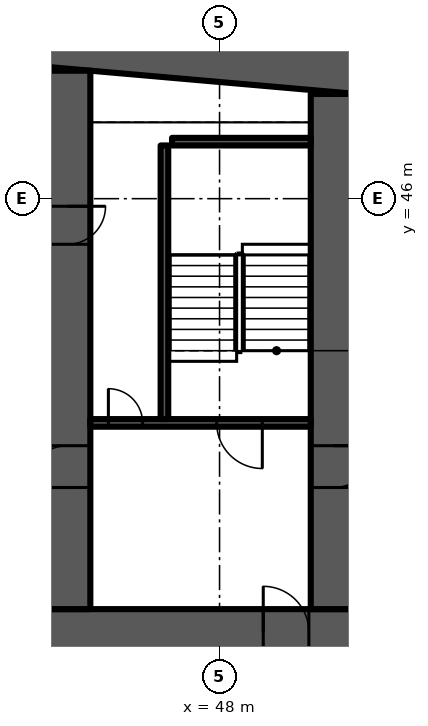
"""IFC4 building model, lengths in metres.
Left out: names, types, materials, properties, quantities, classifications, styles, units other than length and angle.
Written with IfcOpenShell. Run it as: python <this file> out.ifc"""

import sys

from ifc_helpers import new_model, si_unit, direction, frame, frame_2d, origin, place, context, subcontext, project, spatial, polyline, rectangle, outline, extrude, element, fill, save


model = new_model("IFC4")
c1 = context("Model", 3, precision=1e-05, world=origin(), true_north=direction((0.0, 1.0)))
c2 = subcontext(c1, "Body", "Model", "MODEL_VIEW")
j1 = project(units=[si_unit("LENGTHUNIT", "METRE"), si_unit("PLANEANGLEUNIT", "RADIAN")], contexts=[c1])
p1 = place(None, origin())
s1 = spatial("IfcSite", under=j1, at=p1, CompositionType="ELEMENT")
p2 = place(p1, origin())
s2 = spatial("IfcBuilding", under=s1, at=p2, CompositionType="ELEMENT")
p3 = place(p2, frame((0.0, 0.0, 77.5)))
s3 = spatial("IfcBuildingStorey", under=s2, at=p3, CompositionType="ELEMENT", Elevation=77.5)
p4 = place(p3, origin())
e1 = element("IfcWall", 1, at=p4, inside=s3, PredefinedType="SHEAR", context=c2, shape_type="SweptSolid", body=[
    extrude(outline(polyline([(9.0, 47.583), (37.0, 50.032), (65.0, 47.583), (65.0, 48.787), (37.0, 51.237), (9.0, 48.787), (9.0, 47.583)])), origin(), (0.0, 0.0, 1.0), 3.6),
])
p5 = place(p3, frame((9.0, 34.6, 0.0), z_axis=(0.0, 0.0, 1.0), x_axis=(1.0, 0.0, 0.0)))
e2 = element("IfcWall", 2, at=p5, inside=s3, PredefinedType="SHEAR", context=c2, shape_type="SweptSolid", body=[
    extrude(rectangle(XDim=56.0, YDim=1.2, at=frame_2d((28.0, 0.0))), origin(), (0.0, 0.0, 1.0), 3.6),
])
p6 = place(p5, frame((3.3, 0.0, 0.0)))
e3 = element("IfcOpeningElement", 3, at=p6, cuts=e2, PredefinedType="OPENING", context=c2, shape_type="SweptSolid", body=[
    extrude(rectangle(XDim=1.0, YDim=2.1, at=frame_2d((0.5, 1.05))), frame((0.0, 0.61, 0.0), z_axis=(0.0, -1.0, 0.0), x_axis=(1.0, 0.0, 0.0)), (0.0, 0.0, 1.0), 1.22),
])
p7 = place(p5, frame((7.867, 0.0, 0.0)))
e4 = element("IfcOpeningElement", 4, at=p7, cuts=e2, PredefinedType="OPENING", context=c2, shape_type="SweptSolid", body=[
    extrude(rectangle(XDim=1.1, YDim=2.1, at=frame_2d((0.55, 1.05))), frame((0.0, 0.61, 0.0), z_axis=(0.0, -1.0, 0.0), x_axis=(1.0, 0.0, 0.0)), (0.0, 0.0, 1.0), 1.22),
])
p8 = place(p5, frame((12.033, 0.0, 0.0)))
e5 = element("IfcOpeningElement", 5, at=p8, cuts=e2, PredefinedType="OPENING", context=c2, shape_type="SweptSolid", body=[
    extrude(rectangle(XDim=1.1, YDim=2.1, at=frame_2d((0.55, 1.05))), frame((0.0, 0.61, 0.0), z_axis=(0.0, -1.0, 0.0), x_axis=(1.0, 0.0, 0.0)), (0.0, 0.0, 1.0), 1.22),
])
p9 = place(p5, frame((9.8, 0.0, 0.0)))
e6 = element("IfcOpeningElement", 6, at=p9, cuts=e2, PredefinedType="OPENING", context=c2, shape_type="SweptSolid", body=[
    extrude(rectangle(XDim=1.4, YDim=2.1, at=frame_2d((0.7, 1.05))), frame((0.0, 0.61, 0.0), z_axis=(0.0, -1.0, 0.0), x_axis=(1.0, 0.0, 0.0)), (0.0, 0.0, 1.0), 1.22),
])
p10 = place(p5, frame((14.65, 0.0, 0.0)))
e7 = element("IfcOpeningElement", 7, at=p10, cuts=e2, PredefinedType="OPENING", context=c2, shape_type="SweptSolid", body=[
    extrude(rectangle(XDim=1.2, YDim=2.1, at=frame_2d((0.6, 1.05))), frame((0.0, 0.61, 0.0), z_axis=(0.0, -1.0, 0.0), x_axis=(1.0, 0.0, 0.0)), (0.0, 0.0, 1.0), 1.22),
])
p11 = place(p5, frame((21.867, 0.0, 0.0)))
e8 = element("IfcOpeningElement", 8, at=p11, cuts=e2, PredefinedType="OPENING", context=c2, shape_type="SweptSolid", body=[
    extrude(rectangle(XDim=1.1, YDim=2.1, at=frame_2d((0.55, 1.05))), frame((0.0, 0.61, 0.0), z_axis=(0.0, -1.0, 0.0), x_axis=(1.0, 0.0, 0.0)), (0.0, 0.0, 1.0), 1.22),
])
p12 = place(p5, frame((26.033, 0.0, 0.0)))
e9 = element("IfcOpeningElement", 9, at=p12, cuts=e2, PredefinedType="OPENING", context=c2, shape_type="SweptSolid", body=[
    extrude(rectangle(XDim=1.1, YDim=2.1, at=frame_2d((0.55, 1.05))), frame((0.0, 0.61, 0.0), z_axis=(0.0, -1.0, 0.0), x_axis=(1.0, 0.0, 0.0)), (0.0, 0.0, 1.0), 1.22),
])
p13 = place(p5, frame((23.8, 0.0, 0.0)))
e10 = element("IfcOpeningElement", 10, at=p13, cuts=e2, PredefinedType="OPENING", context=c2, shape_type="SweptSolid", body=[
    extrude(rectangle(XDim=1.4, YDim=2.1, at=frame_2d((0.7, 1.05))), frame((0.0, 0.61, 0.0), z_axis=(0.0, -1.0, 0.0), x_axis=(1.0, 0.0, 0.0)), (0.0, 0.0, 1.0), 1.22),
])
p14 = place(p5, frame((28.867, 0.0, 0.0)))
e11 = element("IfcOpeningElement", 11, at=p14, cuts=e2, PredefinedType="OPENING", context=c2, shape_type="SweptSolid", body=[
    extrude(rectangle(XDim=1.1, YDim=2.1, at=frame_2d((0.55, 1.05))), frame((0.0, 0.61, 0.0), z_axis=(0.0, -1.0, 0.0), x_axis=(1.0, 0.0, 0.0)), (0.0, 0.0, 1.0), 1.22),
])
p15 = place(p5, frame((33.033, 0.0, 0.0)))
e12 = element("IfcOpeningElement", 12, at=p15, cuts=e2, PredefinedType="OPENING", context=c2, shape_type="SweptSolid", body=[
    extrude(rectangle(XDim=1.1, YDim=2.1, at=frame_2d((0.55, 1.05))), frame((0.0, 0.61, 0.0), z_axis=(0.0, -1.0, 0.0), x_axis=(1.0, 0.0, 0.0)), (0.0, 0.0, 1.0), 1.22),
])
p16 = place(p5, frame((40.15, 0.0, 0.0)))
e13 = element("IfcOpeningElement", 13, at=p16, cuts=e2, PredefinedType="OPENING", context=c2, shape_type="SweptSolid", body=[
    extrude(rectangle(XDim=1.2, YDim=2.1, at=frame_2d((0.6, 1.05))), frame((0.0, 0.61, 0.0), z_axis=(0.0, -1.0, 0.0), x_axis=(1.0, 0.0, 0.0)), (0.0, 0.0, 1.0), 1.22),
])
p17 = place(p5, frame((44.8, 0.0, 0.0)))
e14 = element("IfcOpeningElement", 14, at=p17, cuts=e2, PredefinedType="OPENING", context=c2, shape_type="SweptSolid", body=[
    extrude(rectangle(XDim=1.4, YDim=2.1, at=frame_2d((0.7, 1.05))), frame((0.0, 0.61, 0.0), z_axis=(0.0, -1.0, 0.0), x_axis=(1.0, 0.0, 0.0)), (0.0, 0.0, 1.0), 1.22),
])
p18 = place(p5, frame((49.867, 0.0, 0.0)))
e15 = element("IfcOpeningElement", 15, at=p18, cuts=e2, PredefinedType="OPENING", context=c2, shape_type="SweptSolid", body=[
    extrude(rectangle(XDim=1.1, YDim=2.1, at=frame_2d((0.55, 1.05))), frame((0.0, 0.61, 0.0), z_axis=(0.0, -1.0, 0.0), x_axis=(1.0, 0.0, 0.0)), (0.0, 0.0, 1.0), 1.22),
])
p19 = place(p5, frame((53.5, 0.0, 0.0)))
e16 = element("IfcOpeningElement", 16, at=p19, cuts=e2, PredefinedType="OPENING", context=c2, shape_type="SweptSolid", body=[
    extrude(rectangle(XDim=1.1, YDim=2.1, at=frame_2d((0.55, 1.05))), frame((0.0, 0.61, 0.0), z_axis=(0.0, -1.0, 0.0), x_axis=(1.0, 0.0, 0.0)), (0.0, 0.0, 1.0), 1.22),
])
p20 = place(p5, frame((51.567, 0.0, 0.0)))
e17 = element("IfcOpeningElement", 17, at=p20, cuts=e2, PredefinedType="OPENING", context=c2, shape_type="SweptSolid", body=[
    extrude(rectangle(XDim=1.4, YDim=2.1, at=frame_2d((0.7, 1.05))), frame((0.0, 0.61, 0.0), z_axis=(0.0, -1.0, 0.0), x_axis=(1.0, 0.0, 0.0)), (0.0, 0.0, 1.0), 1.22),
])
p21 = place(p3, frame((44.0, 35.2, 0.0), z_axis=(0.0, 0.0, 1.0), x_axis=(0.0, 1.0, 0.0)))
e18 = element("IfcWall", 18, at=p21, inside=s3, PredefinedType="SHEAR", context=c2, shape_type="SweptSolid", body=[
    extrude(rectangle(XDim=14.168, YDim=1.2, at=frame_2d((7.084, 0.0))), origin(), (0.0, 0.0, 1.0), 3.6),
])
p22 = place(p21, frame((3.2, 0.0, 0.0)))
e19 = element("IfcOpeningElement", 19, at=p22, cuts=e18, PredefinedType="OPENING", context=c2, shape_type="SweptSolid", body=[
    extrude(rectangle(XDim=1.1, YDim=2.1, at=frame_2d((0.55, 1.05))), frame((0.0, 0.61, 0.0), z_axis=(0.0, -1.0, 0.0), x_axis=(1.0, 0.0, 0.0)), (0.0, 0.0, 1.0), 1.22),
])
p23 = place(p21, frame((9.6, 0.0, 0.0)))
e20 = element("IfcOpeningElement", 20, at=p23, cuts=e18, PredefinedType="OPENING", context=c2, shape_type="SweptSolid", body=[
    extrude(rectangle(XDim=1.0, YDim=2.1, at=frame_2d((0.5, 1.05))), frame((0.0, 0.61, 0.0), z_axis=(0.0, -1.0, 0.0), x_axis=(1.0, 0.0, 0.0)), (0.0, 0.0, 1.0), 1.22),
])
p24 = place(p3, frame((51.0, 35.2, 0.0), z_axis=(0.0, 0.0, 1.0), x_axis=(0.0, 1.0, 0.0)))
e21 = element("IfcWall", 21, at=p24, inside=s3, PredefinedType="SHEAR", context=c2, shape_type="SweptSolid", body=[
    extrude(rectangle(XDim=13.555, YDim=1.2, at=frame_2d((6.778, 0.0))), origin(), (0.0, 0.0, 1.0), 3.6),
])
p25 = place(p24, frame((3.2, 0.0, 0.0)))
e22 = element("IfcOpeningElement", 22, at=p25, cuts=e21, PredefinedType="OPENING", context=c2, shape_type="SweptSolid", body=[
    extrude(rectangle(XDim=1.1, YDim=2.1, at=frame_2d((0.55, 1.05))), frame((0.0, 0.61, 0.0), z_axis=(0.0, -1.0, 0.0), x_axis=(1.0, 0.0, 0.0)), (0.0, 0.0, 1.0), 1.22),
])
p26 = place(p3, frame((44.6, 40.1, 0.0), z_axis=(0.0, 0.0, 1.0), x_axis=(1.0, 0.0, 0.0)))
e23 = element("IfcWall", 23, at=p26, inside=s3, PredefinedType="SHEAR", context=c2, shape_type="SweptSolid", body=[
    extrude(rectangle(XDim=5.8, YDim=0.2, at=frame_2d((2.9, 0.0))), origin(), (0.0, 0.0, 1.0), 3.2),
])
p27 = place(p26, frame((3.325, 0.0, 0.0)))
e24 = element("IfcOpeningElement", 24, at=p27, cuts=e23, PredefinedType="OPENING", context=c2, shape_type="SweptSolid", body=[
    extrude(rectangle(XDim=1.2, YDim=2.1, at=frame_2d((0.6, 1.05))), frame((0.0, 0.11, 0.0), z_axis=(0.0, -1.0, 0.0), x_axis=(1.0, 0.0, 0.0)), (0.0, 0.0, 1.0), 0.22),
])
p28 = place(p26, frame((0.475, 0.0, 0.0)))
e25 = element("IfcOpeningElement", 25, at=p28, cuts=e23, PredefinedType="OPENING", context=c2, shape_type="SweptSolid", body=[
    extrude(rectangle(XDim=0.9, YDim=2.1, at=frame_2d((0.45, 1.05))), frame((0.0, 0.11, 0.0), z_axis=(0.0, -1.0, 0.0), x_axis=(1.0, 0.0, 0.0)), (0.0, 0.0, 1.0), 0.22),
])
p29 = place(p3, frame((46.55, 40.2, 0.0), z_axis=(0.0, 0.0, 1.0), x_axis=(0.0, 1.0, 0.0)))
e26 = element("IfcWall", 26, at=p29, inside=s3, PredefinedType="SHEAR", context=c2, shape_type="SweptSolid", body=[
    extrude(rectangle(XDim=7.2, YDim=0.2, at=frame_2d((3.6, 0.0))), origin(), (0.0, 0.0, 1.0), 3.2),
])
p30 = place(p3, frame((46.75, 47.5, 0.0), z_axis=(0.0, 0.0, 1.0), x_axis=(1.0, 0.0, 0.0)))
e27 = element("IfcWall", 27, at=p30, inside=s3, PredefinedType="SHEAR", context=c2, shape_type="SweptSolid", body=[
    extrude(rectangle(XDim=3.65, YDim=0.2, at=frame_2d((1.825, 0.0))), origin(), (0.0, 0.0, 1.0), 3.2),
])
p31 = place(p27, origin())
e28 = element("IfcDoor", 28, at=p31, inside=s3, OperationType="SINGLE_SWING_RIGHT", PredefinedType="DOOR", context=c2, shape_type="SweptSolid", body=[
    extrude(rectangle(XDim=1.2, YDim=2.1, at=frame_2d((0.6, 1.05))), frame((0.0, 0.025, 0.0), z_axis=(0.0, -1.0, 0.0), x_axis=(1.0, 0.0, 0.0)), (0.0, 0.0, 1.0), 0.05),
])
fill(e24, e28)
p32 = place(p28, origin())
e29 = element("IfcDoor", 29, at=p32, inside=s3, OperationType="SINGLE_SWING_LEFT", PredefinedType="DOOR", context=c2, shape_type="SweptSolid", body=[
    extrude(rectangle(XDim=0.9, YDim=2.1, at=frame_2d((0.45, 1.05))), frame((0.0, 0.025, 0.0), z_axis=(0.0, -1.0, 0.0), x_axis=(1.0, 0.0, 0.0)), (0.0, 0.0, 1.0), 0.05),
])
fill(e25, e29)
p33 = place(p16, origin())
e30 = element("IfcDoor", 30, at=p33, inside=s3, OperationType="SINGLE_SWING_LEFT", PredefinedType="DOOR", context=c2, shape_type="SweptSolid", body=[
    extrude(rectangle(XDim=1.2, YDim=2.1, at=frame_2d((0.6, 1.05))), frame((0.0, 0.025, 0.0), z_axis=(0.0, -1.0, 0.0), x_axis=(1.0, 0.0, 0.0)), (0.0, 0.0, 1.0), 0.05),
])
fill(e13, e30)
p34 = place(p22, origin())
e31 = element("IfcDoor", 31, at=p34, inside=s3, OperationType="SINGLE_SWING_LEFT", PredefinedType="DOOR", context=c2, shape_type="SweptSolid", body=[
    extrude(rectangle(XDim=1.1, YDim=2.1, at=frame_2d((0.55, 1.05))), frame((0.0, 0.025, 0.0), z_axis=(0.0, -1.0, 0.0), x_axis=(1.0, 0.0, 0.0)), (0.0, 0.0, 1.0), 0.05),
])
fill(e19, e31)
p35 = place(p23, origin())
e32 = element("IfcDoor", 32, at=p35, inside=s3, OperationType="SINGLE_SWING_RIGHT", PredefinedType="DOOR", context=c2, shape_type="SweptSolid", body=[
    extrude(rectangle(XDim=1.0, YDim=2.1, at=frame_2d((0.5, 1.05))), frame((0.0, 0.6, 0.0), z_axis=(0.0, -1.0, 0.0), x_axis=(1.0, 0.0, 0.0)), (0.0, 0.0, 1.0), 1.199),
])
fill(e20, e32)
p36 = place(p25, origin())
e33 = element("IfcDoor", 33, at=p36, inside=s3, OperationType="SINGLE_SWING_RIGHT", PredefinedType="DOOR", context=c2, shape_type="SweptSolid", body=[
    extrude(rectangle(XDim=1.1, YDim=2.1, at=frame_2d((0.55, 1.05))), frame((0.0, 0.025, 0.0), z_axis=(0.0, -1.0, 0.0), x_axis=(1.0, 0.0, 0.0)), (0.0, 0.0, 1.0), 0.05),
])
fill(e22, e33)
save(model, sys.argv[1])
